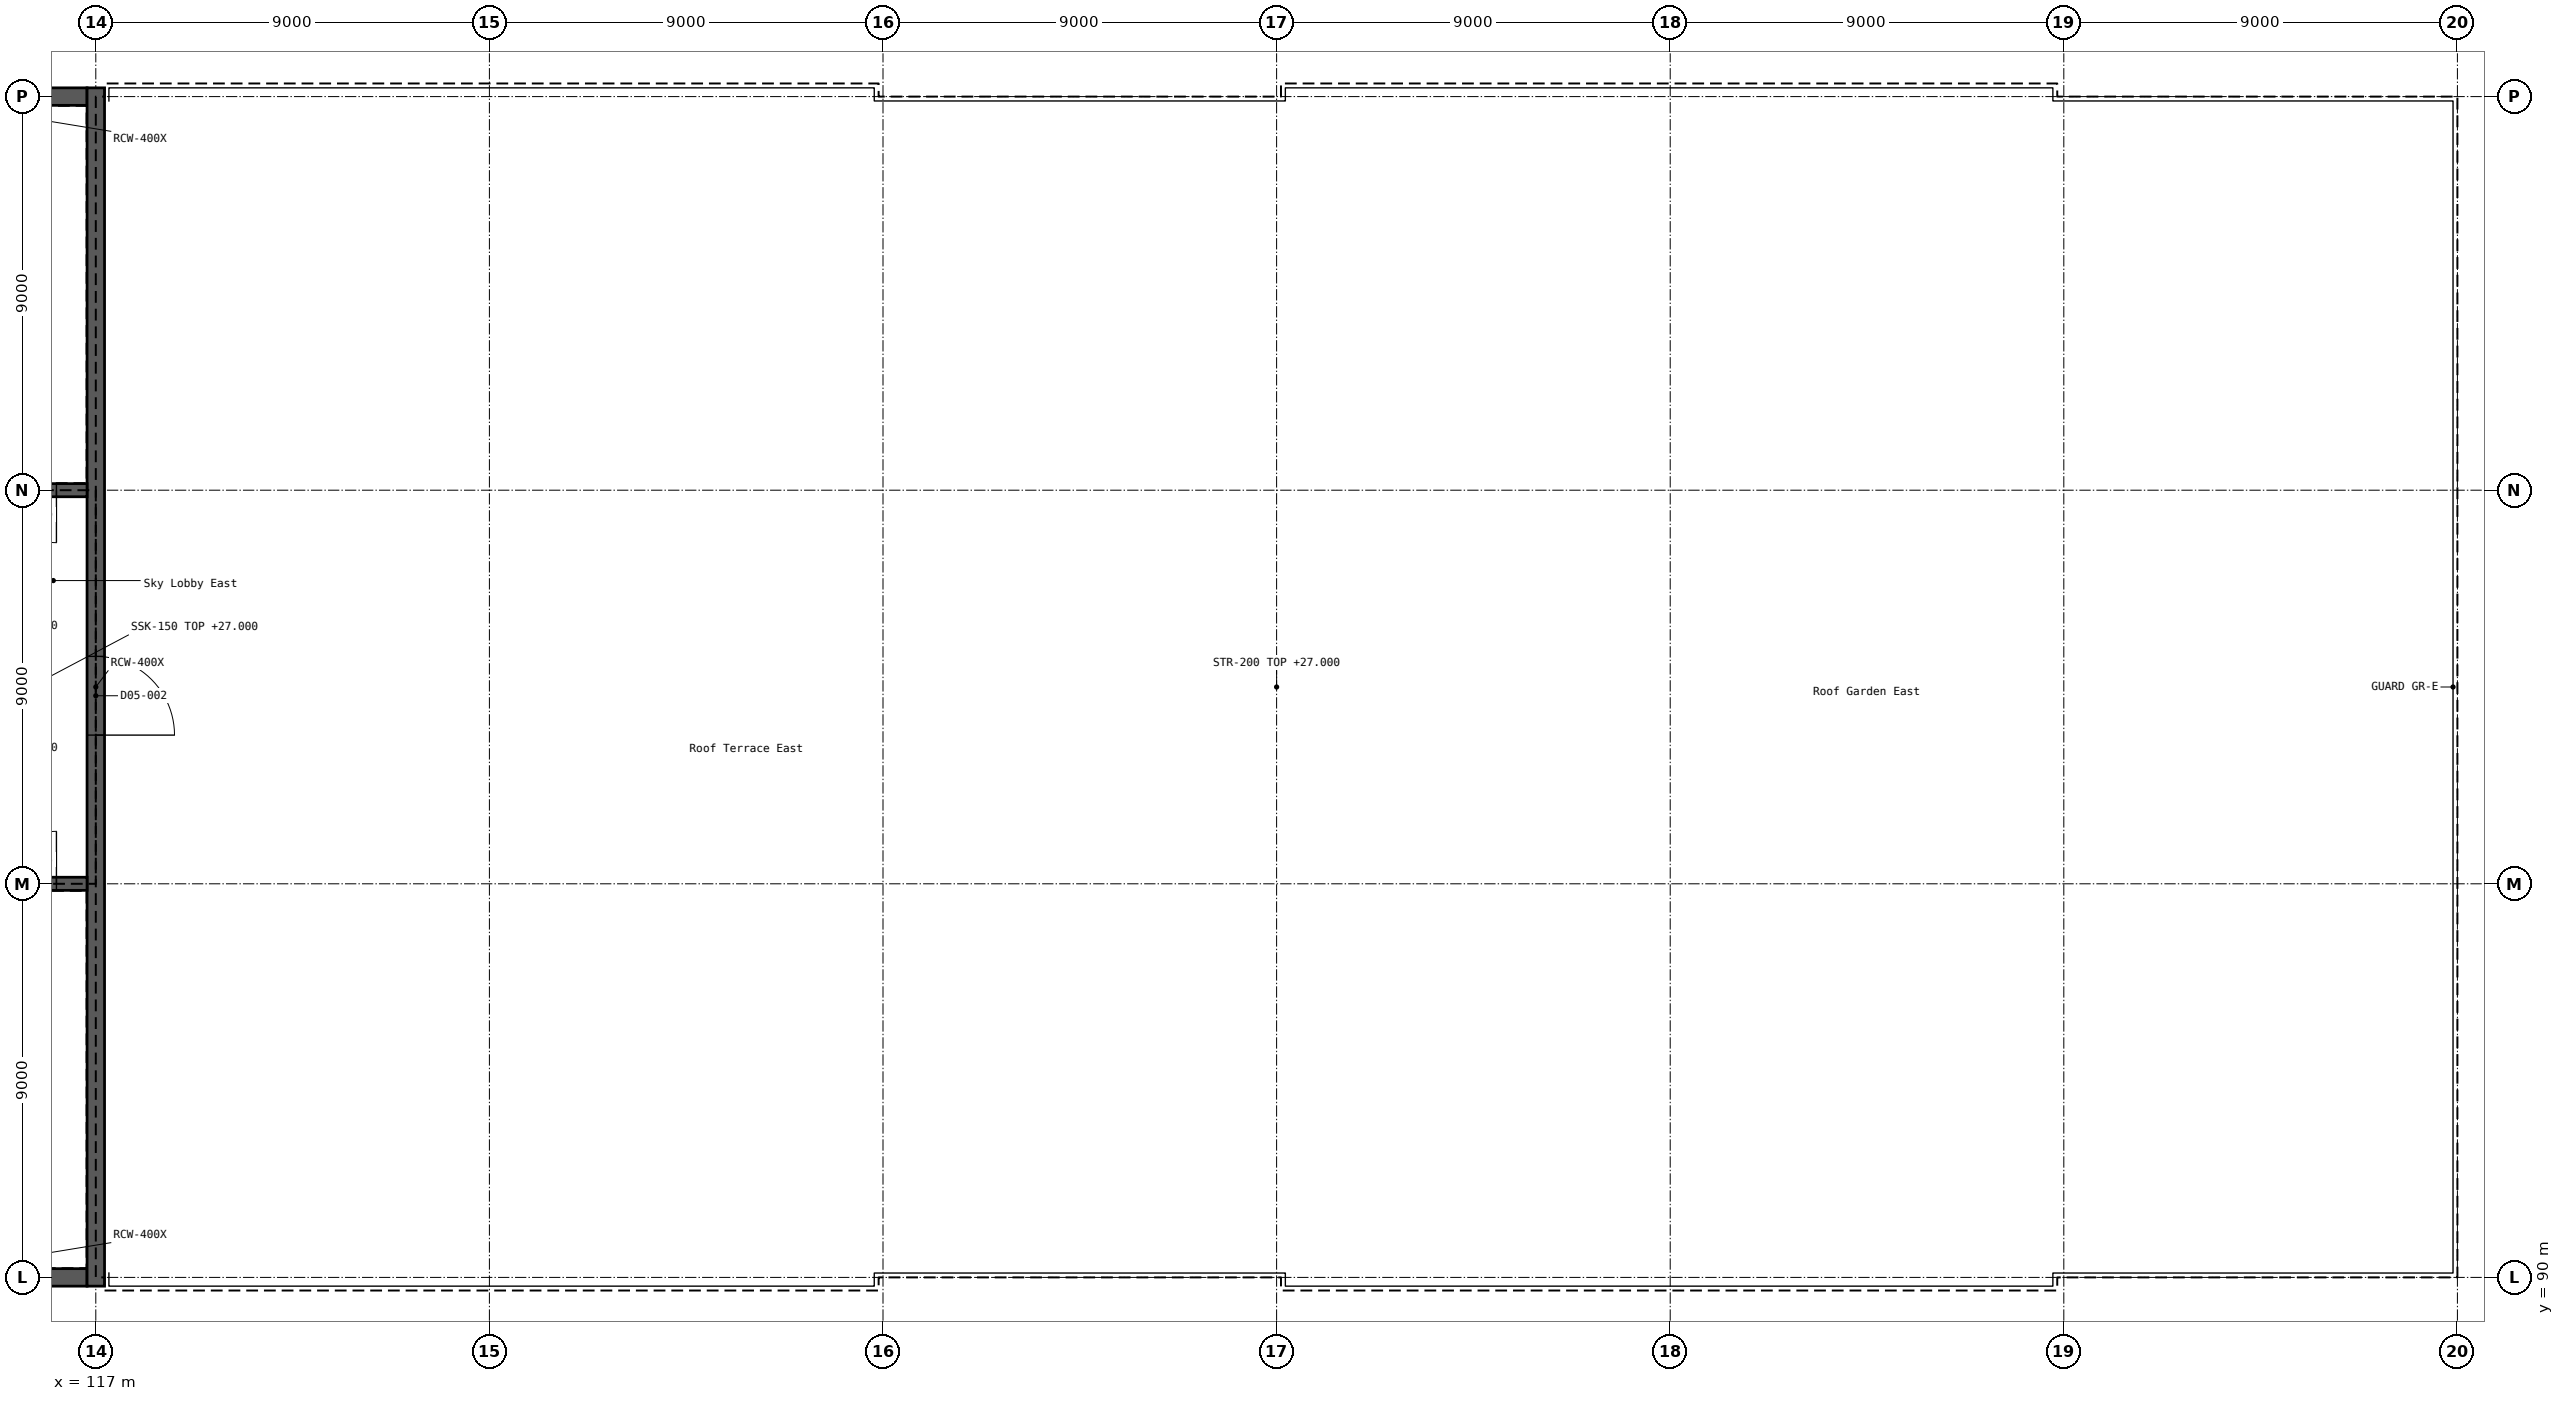
"""IFC4 building model, lengths in metres.
Left out: names, types, materials, properties, quantities, classifications, styles, units other than length and angle.
Written with IfcOpenShell. Run it as: python <this file> out.ifc"""

import sys

from ifc_helpers import new_model, si_unit, direction, frame, frame_2d, origin, place, context, subcontext, project, spatial, rectangle, extrude, element, fill, save


model = new_model("IFC4")
c1 = context("Model", 3, precision=1e-05, world=origin(), true_north=direction((0.0, 1.0)))
c2 = subcontext(c1, "Body", "Model", "MODEL_VIEW")
j1 = project(units=[si_unit("LENGTHUNIT", "METRE"), si_unit("PLANEANGLEUNIT", "RADIAN")], contexts=[c1])
p1 = place(None, origin())
s1 = spatial("IfcSite", under=j1, at=p1, CompositionType="ELEMENT")
p2 = place(p1, origin())
s2 = spatial("IfcBuilding", under=s1, at=p2, CompositionType="ELEMENT")
p3 = place(p2, frame((0.0, 0.0, 27.0)))
s3 = spatial("IfcBuildingStorey", under=s2, at=p3, CompositionType="ELEMENT", Elevation=27.0)
p4 = place(p3, frame((108.2, 90.0, 0.0), z_axis=(0.0, 0.0, 1.0), x_axis=(1.0, 0.0, 0.0)))
e1 = element("IfcWall", 1, at=p4, inside=s3, PredefinedType="SHEAR", context=c2, shape_type="SweptSolid", body=[
    extrude(rectangle(XDim=8.6, YDim=0.4, at=frame_2d((4.3, 0.0))), origin(), (0.0, 0.0, 1.0), 5.4),
])
p5 = place(p4, frame((3.75, 0.0, 1.5)))
e2 = element("IfcOpeningElement", 2, at=p5, cuts=e1, PredefinedType="OPENING", context=c2, shape_type="SweptSolid", body=[
    extrude(rectangle(XDim=1.5, YDim=1.8, at=frame_2d((0.75, 0.9))), frame((0.0, 0.211, 0.0), z_axis=(0.0, -1.0, 0.0), x_axis=(1.0, 0.0, 0.0)), (0.0, 0.0, 1.0), 0.422),
])
p6 = place(p3, frame((108.2, 117.0, 0.0), z_axis=(0.0, 0.0, 1.0), x_axis=(1.0, 0.0, 0.0)))
e3 = element("IfcWall", 3, at=p6, inside=s3, PredefinedType="SHEAR", context=c2, shape_type="SweptSolid", body=[
    extrude(rectangle(XDim=8.6, YDim=0.4, at=frame_2d((4.3, 0.0))), origin(), (0.0, 0.0, 1.0), 5.4),
])
p7 = place(p6, frame((3.75, 0.0, 1.5)))
e4 = element("IfcOpeningElement", 4, at=p7, cuts=e3, PredefinedType="OPENING", context=c2, shape_type="SweptSolid", body=[
    extrude(rectangle(XDim=1.5, YDim=1.8, at=frame_2d((0.75, 0.9))), frame((0.0, 0.211, 0.0), z_axis=(0.0, -1.0, 0.0), x_axis=(1.0, 0.0, 0.0)), (0.0, 0.0, 1.0), 0.422),
])
p8 = place(p3, frame((117.0, 89.8, 0.0), z_axis=(0.0, 0.0, 1.0), x_axis=(0.0, 1.0, 0.0)))
e5 = element("IfcWall", 5, at=p8, inside=s3, PredefinedType="SHEAR", context=c2, shape_type="SweptSolid", body=[
    extrude(rectangle(XDim=27.4, YDim=0.4, at=frame_2d((13.7, 0.0))), origin(), (0.0, 0.0, 1.0), 5.4),
])
p9 = place(p8, frame((12.6, 0.0, 0.0)))
e6 = element("IfcOpeningElement", 6, at=p9, cuts=e5, PredefinedType="OPENING", context=c2, shape_type="SweptSolid", body=[
    extrude(rectangle(XDim=1.8, YDim=2.1, at=frame_2d((0.9, 1.05))), frame((0.0, 0.211, 0.0), z_axis=(0.0, -1.0, 0.0), x_axis=(1.0, 0.0, 0.0)), (0.0, 0.0, 1.0), 0.422),
])
p10 = place(p3, frame((108.2, 99.0, 0.0), z_axis=(0.0, 0.0, 1.0), x_axis=(1.0, 0.0, 0.0)))
e7 = element("IfcWall", 7, at=p10, inside=s3, PredefinedType="SHEAR", context=c2, shape_type="SweptSolid", body=[
    extrude(rectangle(XDim=8.6, YDim=0.3, at=frame_2d((4.3, 0.0))), origin(), (0.0, 0.0, 1.0), 5.4),
])
p11 = place(p10, frame((6.7, 0.0, 0.0)))
e8 = element("IfcOpeningElement", 8, at=p11, cuts=e7, PredefinedType="OPENING", context=c2, shape_type="SweptSolid", body=[
    extrude(rectangle(XDim=1.2, YDim=2.1, at=frame_2d((0.6, 1.05))), frame((0.0, 0.161, 0.0), z_axis=(0.0, -1.0, 0.0), x_axis=(1.0, 0.0, 0.0)), (0.0, 0.0, 1.0), 0.322),
])
p12 = place(p3, frame((108.2, 108.0, 0.0), z_axis=(0.0, 0.0, 1.0), x_axis=(1.0, 0.0, 0.0)))
e9 = element("IfcWall", 9, at=p12, inside=s3, PredefinedType="SHEAR", context=c2, shape_type="SweptSolid", body=[
    extrude(rectangle(XDim=8.6, YDim=0.3, at=frame_2d((4.3, 0.0))), origin(), (0.0, 0.0, 1.0), 5.4),
])
p13 = place(p12, frame((6.7, 0.0, 0.0)))
e10 = element("IfcOpeningElement", 10, at=p13, cuts=e9, PredefinedType="OPENING", context=c2, shape_type="SweptSolid", body=[
    extrude(rectangle(XDim=1.2, YDim=2.1, at=frame_2d((0.6, 1.05))), frame((0.0, 0.161, 0.0), z_axis=(0.0, -1.0, 0.0), x_axis=(1.0, 0.0, 0.0)), (0.0, 0.0, 1.0), 0.322),
])
p14 = place(p9, frame((1.8, 0.0, 0.0), z_axis=(0.0, 0.0, 1.0), x_axis=(-1.0, 0.0, 0.0)))
e11 = element("IfcDoor", 11, at=p14, inside=s3, OperationType="DOUBLE_DOOR_DOUBLE_SWING", PredefinedType="DOOR", context=c2, shape_type="SweptSolid", body=[
    extrude(rectangle(XDim=1.8, YDim=2.1, at=frame_2d((0.9, 1.05))), frame((0.0, 0.025, 0.0), z_axis=(0.0, -1.0, 0.0), x_axis=(1.0, 0.0, 0.0)), (0.0, 0.0, 1.0), 0.05),
])
fill(e6, e11)
p15 = place(p11, origin())
e12 = element("IfcDoor", 12, at=p15, inside=s3, OperationType="SINGLE_SWING_RIGHT", PredefinedType="DOOR", context=c2, shape_type="SweptSolid", body=[
    extrude(rectangle(XDim=1.2, YDim=2.1, at=frame_2d((0.6, 1.05))), frame((0.0, 0.025, 0.0), z_axis=(0.0, -1.0, 0.0), x_axis=(1.0, 0.0, 0.0)), (0.0, 0.0, 1.0), 0.05),
])
fill(e8, e12)
p16 = place(p13, frame((1.2, 0.0, 0.0), z_axis=(0.0, 0.0, 1.0), x_axis=(-1.0, 0.0, 0.0)))
e13 = element("IfcDoor", 13, at=p16, inside=s3, OperationType="SINGLE_SWING_LEFT", PredefinedType="DOOR", context=c2, shape_type="SweptSolid", body=[
    extrude(rectangle(XDim=1.2, YDim=2.1, at=frame_2d((0.6, 1.05))), frame((0.0, 0.025, 0.0), z_axis=(0.0, -1.0, 0.0), x_axis=(1.0, 0.0, 0.0)), (0.0, 0.0, 1.0), 0.05),
])
fill(e10, e13)
save(model, sys.argv[1])
